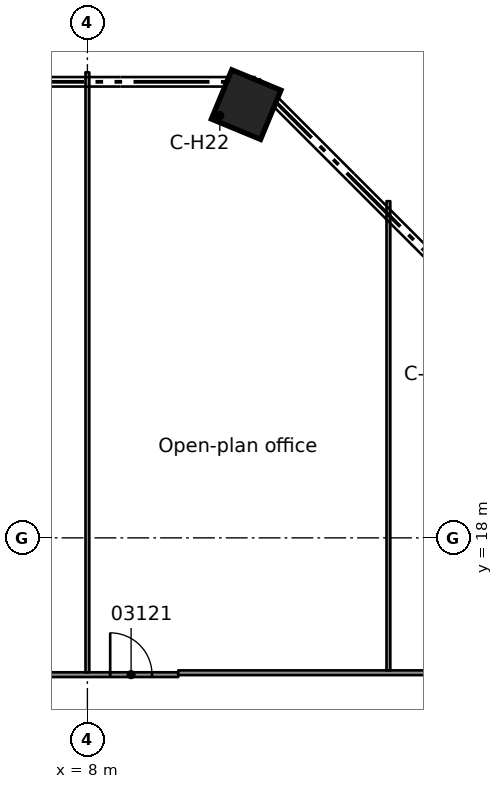
"""IFC4 building model, lengths in metres.
Left out: names, types, materials, properties, quantities, classifications, styles, units other than length and angle.
Written with IfcOpenShell. Run it as: python <this file> out.ifc"""

import sys

from ifc_helpers import new_model, si_unit, direction, frame, frame_2d, origin, origin_2d, place, context, subcontext, project, spatial, rectangle, extrude, element, fill, save


model = new_model("IFC4")
c1 = context("Model", 3, precision=1e-05, world=origin(), true_north=direction((0.0, 1.0)))
c2 = subcontext(c1, "Body", "Model", "MODEL_VIEW")
j1 = project(units=[si_unit("LENGTHUNIT", "METRE"), si_unit("PLANEANGLEUNIT", "RADIAN")], contexts=[c1])
p1 = place(None, origin())
s1 = spatial("IfcSite", under=j1, at=p1, CompositionType="ELEMENT")
p2 = place(p1, origin())
s2 = spatial("IfcBuilding", under=s1, at=p2, CompositionType="ELEMENT")
p3 = place(p2, frame((0.0, 0.0, 15.5)))
s3 = spatial("IfcBuildingStorey", under=s2, at=p3, CompositionType="ELEMENT", Elevation=15.5)
p4 = place(p3, frame((12.178, 29.4, 0.0), z_axis=(0.0, 0.0, 1.0), x_axis=(0.382683432365, 0.923879532511, 0.0)))
e1 = element("IfcColumn", 1, at=p4, inside=s3, PredefinedType="COLUMN", context=c2, shape_type="SweptSolid", body=[
    extrude(rectangle(XDim=1.4, YDim=1.4, at=origin_2d()), origin(), (0.0, 0.0, 1.0), 5.0),
])
p5 = place(p3, frame((-10.39, 14.401, 0.0), z_axis=(0.0, 0.0, 1.0), x_axis=(1.0, 0.0, 0.0)))
e2 = element("IfcWall", 2, at=p5, inside=s3, PredefinedType="PARTITIONING", context=c2, shape_type="SweptSolid", body=[
    extrude(rectangle(XDim=20.781, YDim=0.125, at=frame_2d((10.391, 0.0))), origin(), (0.0, 0.0, 1.0), 4.58),
])
p6 = place(p5, frame((18.99, 0.0, 0.0)))
e3 = element("IfcOpeningElement", 3, at=p6, cuts=e2, PredefinedType="OPENING", context=c2, shape_type="SweptSolid", body=[
    extrude(rectangle(XDim=1.1, YDim=2.1, at=frame_2d((0.55, 1.05))), frame((0.0, 0.073, 0.0), z_axis=(0.0, -1.0, 0.0), x_axis=(1.0, 0.0, 0.0)), (0.0, 0.0, 1.0), 0.145),
])
p7 = place(p5, frame((13.99, 0.0, 0.0)))
e4 = element("IfcOpeningElement", 4, at=p7, cuts=e2, PredefinedType="OPENING", context=c2, shape_type="SweptSolid", body=[
    extrude(rectangle(XDim=0.9, YDim=2.1, at=frame_2d((0.45, 1.05))), frame((0.0, 0.073, 0.0), z_axis=(0.0, -1.0, 0.0), x_axis=(1.0, 0.0, 0.0)), (0.0, 0.0, 1.0), 0.145),
])
p8 = place(p5, frame((5.99, 0.0, 0.0)))
e5 = element("IfcOpeningElement", 5, at=p8, cuts=e2, PredefinedType="OPENING", context=c2, shape_type="SweptSolid", body=[
    extrude(rectangle(XDim=0.9, YDim=2.1, at=frame_2d((0.45, 1.05))), frame((0.0, 0.073, 0.0), z_axis=(0.0, -1.0, 0.0), x_axis=(1.0, 0.0, 0.0)), (0.0, 0.0, 1.0), 0.145),
])
p9 = place(p5, frame((0.6, 0.0, 0.0)))
e6 = element("IfcOpeningElement", 6, at=p9, cuts=e2, PredefinedType="OPENING", context=c2, shape_type="SweptSolid", body=[
    extrude(rectangle(XDim=1.1, YDim=2.1, at=frame_2d((0.55, 1.05))), frame((0.0, 0.073, 0.0), z_axis=(0.0, -1.0, 0.0), x_axis=(1.0, 0.0, 0.0)), (0.0, 0.0, 1.0), 0.145),
])
p10 = place(p3, frame((10.391, 14.451, 0.0), z_axis=(0.0, 0.0, 1.0), x_axis=(1.0, 0.0, 0.0)))
e7 = element("IfcWall", 7, at=p10, inside=s3, PredefinedType="PARTITIONING", context=c2, shape_type="SweptSolid", body=[
    extrude(rectangle(XDim=10.996, YDim=0.125, at=frame_2d((5.498, 0.0))), origin(), (0.0, 0.0, 1.0), 4.58),
])
p11 = place(p10, frame((7.38, 0.0, 0.0)))
e8 = element("IfcOpeningElement", 8, at=p11, cuts=e7, PredefinedType="OPENING", context=c2, shape_type="SweptSolid", body=[
    extrude(rectangle(XDim=1.8, YDim=2.1, at=frame_2d((0.9, 1.05))), frame((0.0, 0.073, 0.0), z_axis=(0.0, -1.0, 0.0), x_axis=(1.0, 0.0, 0.0)), (0.0, 0.0, 1.0), 0.145),
])
p12 = place(p3, frame((15.921, 14.514, 0.0), z_axis=(0.0, 0.0, 1.0), x_axis=(0.0, 1.0, 0.0)))
e9 = element("IfcWall", 9, at=p12, inside=s3, PredefinedType="PARTITIONING", context=c2, shape_type="SweptSolid", body=[
    extrude(rectangle(XDim=12.345, YDim=0.1, at=frame_2d((6.172, 0.0))), origin(), (0.0, 0.0, 1.0), 4.58),
])
p13 = place(p3, frame((8.0, 14.463, 0.0), z_axis=(0.0, 0.0, 1.0), x_axis=(0.0, 1.0, 0.0)))
e10 = element("IfcWall", 10, at=p13, inside=s3, PredefinedType="PARTITIONING", context=c2, shape_type="SweptSolid", body=[
    extrude(rectangle(XDim=15.787, YDim=0.1, at=frame_2d((7.894, 0.0))), origin(), (0.0, 0.0, 1.0), 4.58),
])
p14 = place(p6, origin())
e11 = element("IfcDoor", 11, at=p14, inside=s3, OperationType="SINGLE_SWING_RIGHT", PredefinedType="DOOR", context=c2, shape_type="SweptSolid", body=[
    extrude(rectangle(XDim=1.1, YDim=2.1, at=frame_2d((0.55, 1.05))), frame((0.0, 0.025, 0.0), z_axis=(0.0, -1.0, 0.0), x_axis=(1.0, 0.0, 0.0)), (0.0, 0.0, 1.0), 0.05),
])
fill(e3, e11)
save(model, sys.argv[1])
